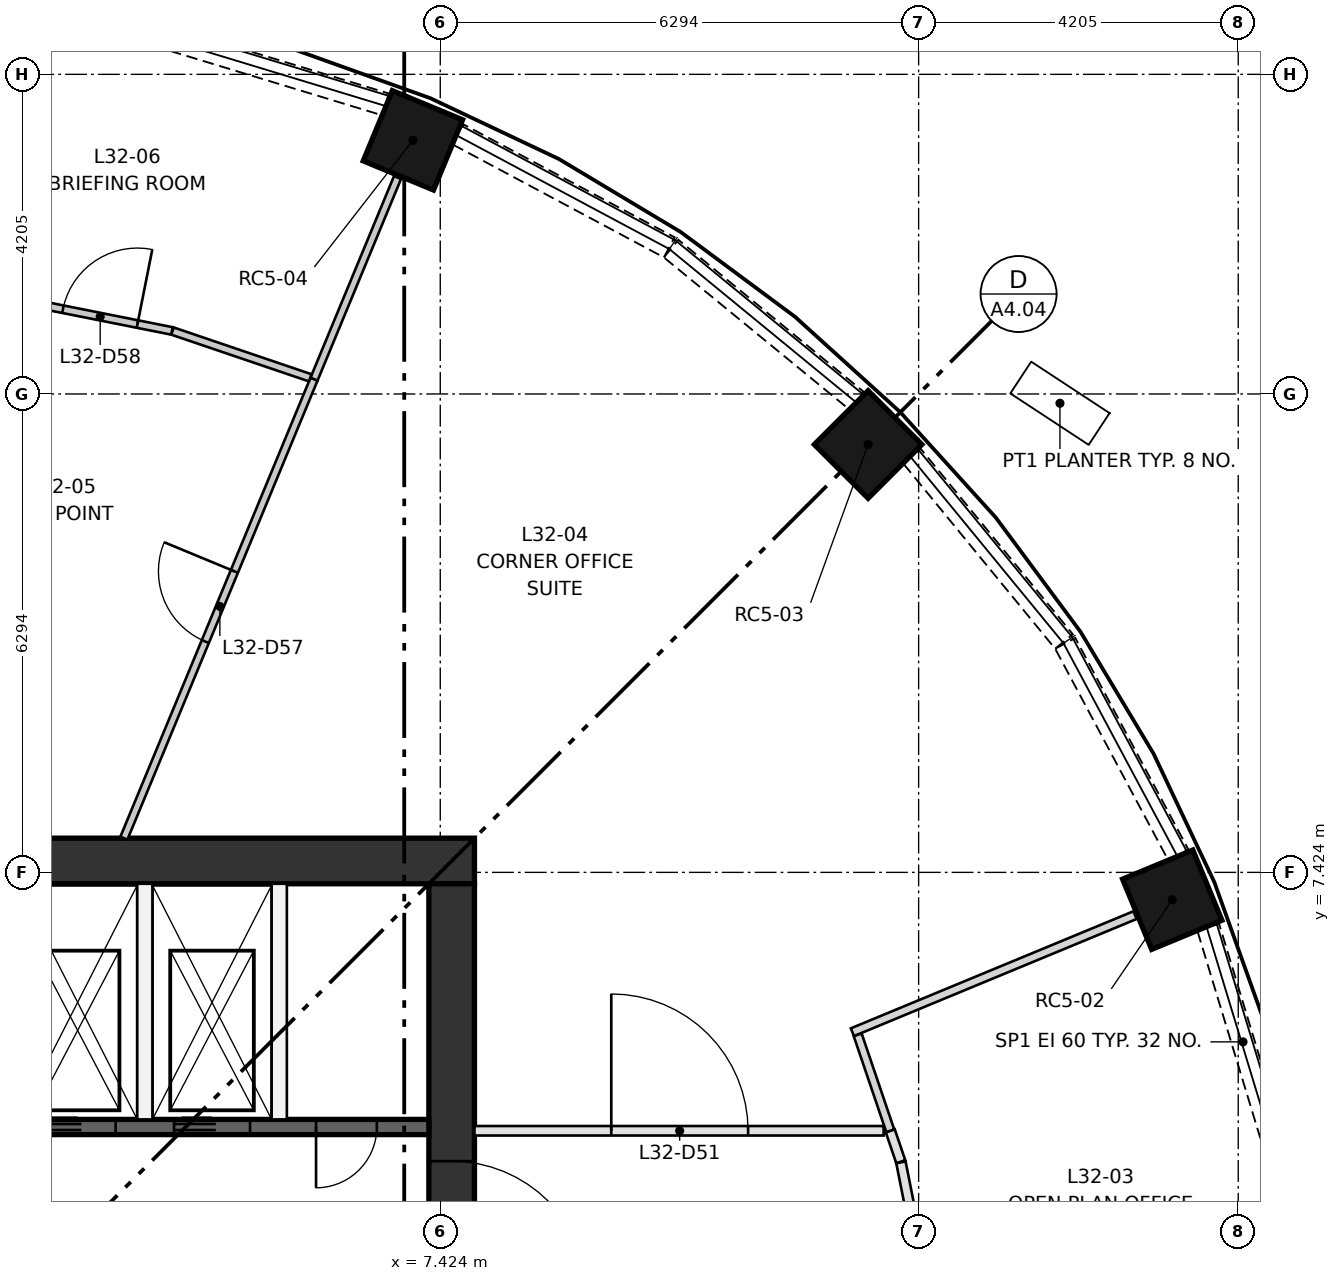
"""IFC4 building model, lengths in metres.
Left out: names, types, materials, properties, quantities, classifications, styles, units other than length and angle.
Written with IfcOpenShell. Run it as: python <this file> out.ifc"""

import sys

from ifc_helpers import new_model, si_unit, direction, frame, frame_2d, origin, origin_2d, place, context, subcontext, project, spatial, rectangle, extrude, element, fill, save


model = new_model("IFC4")
c1 = context("Model", 3, precision=1e-05, world=origin(), true_north=direction((0.0, 1.0)))
c2 = subcontext(c1, "Body", "Model", "MODEL_VIEW")
j1 = project(units=[si_unit("LENGTHUNIT", "METRE"), si_unit("PLANEANGLEUNIT", "RADIAN")], contexts=[c1])
p1 = place(None, origin())
s1 = spatial("IfcSite", under=j1, at=p1, CompositionType="ELEMENT")
p2 = place(p1, origin())
s2 = spatial("IfcBuilding", under=s1, at=p2, CompositionType="ELEMENT")
p3 = place(p2, frame((0.0, 0.0, 124.3)))
s3 = spatial("IfcBuildingStorey", under=s2, at=p3, CompositionType="ELEMENT", Elevation=124.3)
for number, where, z_axis, x_axis in (
    (1, (17.055, 7.064, 0.0), (0.0, 0.0, 1.0), (0.924, 0.383, 0.0)),
    (2, (13.053, 13.053, 0.0), (0.0, 0.0, 1.0), (0.707, 0.707, 0.0)),
    (3, (7.064, 17.055, 0.0), (0.0, 0.0, 1.0), (0.383, 0.924, 0.0)),
):
    element("IfcColumn", number, at=place(p3, frame(where, z_axis=z_axis, x_axis=x_axis)), inside=s3, PredefinedType="COLUMN", context=c2, shape_type="SweptSolid", body=[
        extrude(rectangle(XDim=1.0, YDim=1.0, at=origin_2d()), origin(), (0.0, 0.0, 1.0), 3.35),
    ])
p4 = place(p3, frame((-7.874, 7.574, 0.0), z_axis=(0.0, 0.0, 1.0), x_axis=(1.0, 0.0, 0.0)))
e4 = element("IfcWall", 4, at=p4, inside=s3, PredefinedType="SHEAR", context=c2, shape_type="SweptSolid", body=[
    extrude(rectangle(XDim=15.748, YDim=0.6, at=frame_2d((7.874, 0.0))), origin(), (0.0, 0.0, 1.0), 3.35),
])
p5 = place(p3, frame((7.574, -7.274, 0.0), z_axis=(0.0, 0.0, 1.0), x_axis=(0.0, 1.0, 0.0)))
e5 = element("IfcWall", 5, at=p5, inside=s3, PredefinedType="SHEAR", context=c2, shape_type="SweptSolid", body=[
    extrude(rectangle(XDim=14.548, YDim=0.6, at=frame_2d((7.274, 0.0))), origin(), (0.0, 0.0, 1.0), 3.35),
])
p6 = place(p5, frame((6.774, 0.0, 0.0)))
e6 = element("IfcOpeningElement", 6, at=p6, cuts=e5, PredefinedType="OPENING", context=c2, shape_type="SweptSolid", body=[
    extrude(rectangle(XDim=1.0, YDim=2.1, at=frame_2d((0.5, 1.05))), frame((0.0, 0.31, 0.0), z_axis=(0.0, -1.0, 0.0), x_axis=(1.0, 0.0, 0.0)), (0.0, 0.0, 1.0), 0.62),
])
p7 = place(p5, frame((3.649, 0.0, 0.0)))
e7 = element("IfcOpeningElement", 7, at=p7, cuts=e5, PredefinedType="OPENING", context=c2, shape_type="SweptSolid", body=[
    extrude(rectangle(XDim=1.8, YDim=2.1, at=frame_2d((0.9, 1.05))), frame((0.0, 0.31, 0.0), z_axis=(0.0, -1.0, 0.0), x_axis=(1.0, 0.0, 0.0)), (0.0, 0.0, 1.0), 0.62),
])
p8 = place(p5, frame((9.098, 0.0, 0.0)))
e8 = element("IfcOpeningElement", 8, at=p8, cuts=e5, PredefinedType="OPENING", context=c2, shape_type="SweptSolid", body=[
    extrude(rectangle(XDim=1.8, YDim=2.1, at=frame_2d((0.9, 1.05))), frame((0.0, 0.31, 0.0), z_axis=(0.0, -1.0, 0.0), x_axis=(1.0, 0.0, 0.0)), (0.0, 0.0, 1.0), 0.62),
])
p9 = place(p3, frame((0.0, 4.074, 0.0), z_axis=(0.0, 0.0, 1.0), x_axis=(1.0, 0.0, 0.0)))
e9 = element("IfcWall", 9, at=p9, inside=s3, PredefinedType="SHEAR", context=c2, shape_type="SweptSolid", body=[
    extrude(rectangle(XDim=7.274, YDim=0.2, at=frame_2d((3.637, 0.0))), origin(), (0.0, 0.0, 1.0), 3.0),
])
p10 = place(p9, frame((0.384, 0.0, 0.0)))
e10 = element("IfcOpeningElement", 10, at=p10, cuts=e9, PredefinedType="OPENING", context=c2, shape_type="SweptSolid", body=[
    extrude(rectangle(XDim=1.0, YDim=2.1, at=frame_2d((0.5, 1.05))), frame((0.0, 0.11, 0.0), z_axis=(0.0, -1.0, 0.0), x_axis=(1.0, 0.0, 0.0)), (0.0, 0.0, 1.0), 0.22),
])
p11 = place(p9, frame((2.153, 0.0, 0.0)))
e11 = element("IfcOpeningElement", 11, at=p11, cuts=e9, PredefinedType="OPENING", context=c2, shape_type="SweptSolid", body=[
    extrude(rectangle(XDim=1.0, YDim=2.1, at=frame_2d((0.5, 1.05))), frame((0.0, 0.11, 0.0), z_axis=(0.0, -1.0, 0.0), x_axis=(1.0, 0.0, 0.0)), (0.0, 0.0, 1.0), 0.22),
])
p12 = place(p9, frame((3.921, 0.0, 0.0)))
e12 = element("IfcOpeningElement", 12, at=p12, cuts=e9, PredefinedType="OPENING", context=c2, shape_type="SweptSolid", body=[
    extrude(rectangle(XDim=1.0, YDim=2.1, at=frame_2d((0.5, 1.05))), frame((0.0, 0.11, 0.0), z_axis=(0.0, -1.0, 0.0), x_axis=(1.0, 0.0, 0.0)), (0.0, 0.0, 1.0), 0.22),
])
p13 = place(p9, frame((5.79, 0.0, 0.0)))
e13 = element("IfcOpeningElement", 13, at=p13, cuts=e9, PredefinedType="OPENING", context=c2, shape_type="SweptSolid", body=[
    extrude(rectangle(XDim=0.8, YDim=2.1, at=frame_2d((0.4, 1.05))), frame((0.0, 0.11, 0.0), z_axis=(0.0, -1.0, 0.0), x_axis=(1.0, 0.0, 0.0)), (0.0, 0.0, 1.0), 0.22),
])
for number, where, z_axis, x_axis in (
    (14, (3.537, 4.174, 0.0), (0.0, 0.0, 1.0), (0.0, 1.0, 0.0)),
    (15, (5.305, 4.174, 0.0), (0.0, 0.0, 1.0), (0.0, 1.0, 0.0)),
):
    element("IfcWall", number, at=place(p3, frame(where, z_axis=z_axis, x_axis=x_axis)), inside=s3, PredefinedType="PARTITIONING", context=c2, shape_type="SweptSolid", body=[
        extrude(rectangle(XDim=3.1, YDim=0.2, at=frame_2d((1.55, 0.0))), origin(), (0.0, 0.0, 1.0), 3.0),
    ])
p14 = place(p3, frame((18.445, 3.683, 0.0), z_axis=(0.0, 0.0, 1.0), x_axis=(-0.290503096001, 0.956874051907, 0.0)))
e16 = element("IfcWall", 16, at=p14, inside=s3, PredefinedType="SOLIDWALL", context=c2, shape_type="SweptSolid", body=[
    extrude(rectangle(XDim=3.157, YDim=0.3, at=frame_2d((1.579, 0.0))), origin(), (0.0, 0.0, 1.0), 0.9),
])
p15 = place(p3, frame((17.135, 7.654, 0.0), z_axis=(0.0, 0.0, 1.0), x_axis=(-0.471527722113, 0.881851238747, 0.0)))
e17 = element("IfcWall", 17, at=p15, inside=s3, PredefinedType="SOLIDWALL", context=c2, shape_type="SweptSolid", body=[
    extrude(rectangle(XDim=3.155, YDim=0.3, at=frame_2d((1.578, 0.0))), origin(), (0.0, 0.0, 1.0), 0.9),
])
for number, where, z_axis, x_axis in (
    (18, (15.631, 10.462, 0.0), (0.0, 0.0, 1.0), (-0.634, 0.773, 0.0)),
    (19, (12.902, 13.628, 0.0), (0.0, 0.0, 1.0), (-0.773, 0.634, 0.0)),
):
    element("IfcWall", number, at=place(p3, frame(where, z_axis=z_axis, x_axis=x_axis)), inside=s3, PredefinedType="SOLIDWALL", context=c2, shape_type="SweptSolid", body=[
        extrude(rectangle(XDim=3.157, YDim=0.3, at=frame_2d((1.578, 0.0))), origin(), (0.0, 0.0, 1.0), 0.9),
    ])
p16 = place(p3, frame((10.437, 15.647, 0.0), z_axis=(0.0, 0.0, 1.0), x_axis=(-0.881851238747, 0.471527722113, 0.0)))
e20 = element("IfcWall", 20, at=p16, inside=s3, PredefinedType="SOLIDWALL", context=c2, shape_type="SweptSolid", body=[
    extrude(rectangle(XDim=3.155, YDim=0.3, at=frame_2d((1.578, 0.0))), origin(), (0.0, 0.0, 1.0), 0.9),
])
p17 = place(p3, frame((6.705, 17.527, 0.0), z_axis=(0.0, 0.0, 1.0), x_axis=(-0.956874051907, 0.290503096001, 0.0)))
e21 = element("IfcWall", 21, at=p17, inside=s3, PredefinedType="SOLIDWALL", context=c2, shape_type="SweptSolid", body=[
    extrude(rectangle(XDim=3.157, YDim=0.3, at=frame_2d((1.579, 0.0))), origin(), (0.0, 0.0, 1.0), 0.9),
])
p18 = place(p3, frame((13.345, 4.024, 0.0), z_axis=(0.0, 0.0, 1.0), x_axis=(0.321160043658, -0.947024934391, 0.0)))
e22 = element("IfcWall", 22, at=p18, inside=s3, PredefinedType="PARTITIONING", context=c2, shape_type="SweptSolid", body=[
    extrude(rectangle(XDim=0.43, YDim=0.125, at=frame_2d((0.215, 0.0))), origin(), (0.0, 0.0, 1.0), 3.0),
])
p19 = place(p3, frame((13.485, 3.609, 0.0), z_axis=(0.0, 0.0, 1.0), x_axis=(0.195134630283, -0.980776465901, 0.0)))
e23 = element("IfcWall", 23, at=p19, inside=s3, PredefinedType="PARTITIONING", context=c2, shape_type="SweptSolid", body=[
    extrude(rectangle(XDim=1.818, YDim=0.125, at=frame_2d((0.909, 0.0))), origin(), (0.0, 0.0, 1.0), 3.0),
])
p20 = place(p3, frame((7.874, 4.024, 0.0), z_axis=(0.0, 0.0, 1.0), x_axis=(1.0, 0.0, 0.0)))
e24 = element("IfcWall", 24, at=p20, inside=s3, PredefinedType="PARTITIONING", context=c2, shape_type="SweptSolid", body=[
    extrude(rectangle(XDim=5.384, YDim=0.125, at=frame_2d((2.692, 0.0))), origin(), (0.0, 0.0, 1.0), 3.0),
])
p21 = place(p20, frame((1.8, 0.0, 0.0)))
e25 = element("IfcOpeningElement", 25, at=p21, cuts=e24, PredefinedType="OPENING", context=c2, shape_type="SweptSolid", body=[
    extrude(rectangle(XDim=1.8, YDim=2.1, at=frame_2d((0.9, 1.05))), frame((0.0, 0.073, 0.0), z_axis=(0.0, -1.0, 0.0), x_axis=(1.0, 0.0, 0.0)), (0.0, 0.0, 1.0), 0.145),
])
p22 = place(p3, frame((12.847, 5.321, 0.0), z_axis=(0.0, 0.0, 1.0), x_axis=(0.923877104161, 0.382689294869, 0.0)))
e26 = element("IfcWall", 26, at=p22, inside=s3, PredefinedType="PARTITIONING", context=c2, shape_type="SweptSolid", body=[
    extrude(rectangle(XDim=4.025, YDim=0.11, at=frame_2d((2.012, 0.0))), origin(), (0.0, 0.0, 1.0), 3.0),
])
p23 = place(p3, frame((13.345, 4.024, 0.0), z_axis=(0.0, 0.0, 1.0), x_axis=(-0.32144299332, 0.946928931888, 0.0)))
e27 = element("IfcWall", 27, at=p23, inside=s3, PredefinedType="PARTITIONING", context=c2, shape_type="SweptSolid", body=[
    extrude(rectangle(XDim=1.333, YDim=0.11, at=frame_2d((0.667, 0.0))), origin(), (0.0, 0.0, 1.0), 3.0),
])
p24 = place(p3, frame((3.261, 7.874, 0.0), z_axis=(0.0, 0.0, 1.0), x_axis=(0.382689326263, 0.923877091157, 0.0)))
e28 = element("IfcWall", 28, at=p24, inside=s3, PredefinedType="PARTITIONING", context=c2, shape_type="SweptSolid", body=[
    extrude(rectangle(XDim=6.537, YDim=0.1, at=frame_2d((3.269, 0.0))), origin(), (0.0, 0.0, 1.0), 3.0),
])
p25 = place(p24, frame((2.8, 0.0, 0.0)))
e29 = element("IfcOpeningElement", 29, at=p25, cuts=e28, PredefinedType="OPENING", context=c2, shape_type="SweptSolid", body=[
    extrude(rectangle(XDim=1.0, YDim=2.1, at=frame_2d((0.5, 1.05))), frame((0.0, 0.06, 0.0), z_axis=(0.0, -1.0, 0.0), x_axis=(1.0, 0.0, 0.0)), (0.0, 0.0, 1.0), 0.12),
])
p26 = place(p3, frame((5.763, 13.914, 0.0), z_axis=(0.0, 0.0, 1.0), x_axis=(0.382699877515, 0.923872720536, 0.0)))
e30 = element("IfcWall", 30, at=p26, inside=s3, PredefinedType="PARTITIONING", context=c2, shape_type="SweptSolid", body=[
    extrude(rectangle(XDim=2.87, YDim=0.1, at=frame_2d((1.435, 0.0))), origin(), (0.0, 0.0, 1.0), 3.0),
])
p27 = place(p3, frame((1.969, 14.931, 0.0), z_axis=(0.0, 0.0, 1.0), x_axis=(0.980757237699, -0.195231249295, 0.0)))
e31 = element("IfcWall", 31, at=p27, inside=s3, PredefinedType="PARTITIONING", context=c2, shape_type="SweptSolid", body=[
    extrude(rectangle(XDim=1.963, YDim=0.1, at=frame_2d((0.982, 0.0))), origin(), (0.0, 0.0, 1.0), 3.0),
])
p28 = place(p27, frame((0.5, 0.0, 0.0)))
e32 = element("IfcOpeningElement", 32, at=p28, cuts=e31, PredefinedType="OPENING", context=c2, shape_type="SweptSolid", body=[
    extrude(rectangle(XDim=1.0, YDim=2.1, at=frame_2d((0.5, 1.05))), frame((0.0, 0.06, 0.0), z_axis=(0.0, -1.0, 0.0), x_axis=(1.0, 0.0, 0.0)), (0.0, 0.0, 1.0), 0.12),
])
p29 = place(p3, frame((3.901, 14.546, 0.0), z_axis=(0.0, 0.0, 1.0), x_axis=(0.946972460269, -0.321314735879, 0.0)))
e33 = element("IfcWall", 33, at=p29, inside=s3, PredefinedType="PARTITIONING", context=c2, shape_type="SweptSolid", body=[
    extrude(rectangle(XDim=1.913, YDim=0.1, at=frame_2d((0.957, 0.0))), origin(), (0.0, 0.0, 1.0), 3.0),
])
p30 = place(p11, frame((1.0, 0.0, 0.0), z_axis=(0.0, 0.0, 1.0), x_axis=(-1.0, 0.0, 0.0)))
e34 = element("IfcDoor", 34, at=p30, inside=s3, OperationType="DOUBLE_DOOR_SLIDING", PredefinedType="DOOR", context=c2, shape_type="SweptSolid", body=[
    extrude(rectangle(XDim=1.0, YDim=2.1, at=frame_2d((0.5, 1.05))), frame((0.0, 0.025, 0.0), z_axis=(0.0, -1.0, 0.0), x_axis=(1.0, 0.0, 0.0)), (0.0, 0.0, 1.0), 0.05),
])
fill(e11, e34)
p31 = place(p12, frame((1.0, 0.0, 0.0), z_axis=(0.0, 0.0, 1.0), x_axis=(-1.0, 0.0, 0.0)))
e35 = element("IfcDoor", 35, at=p31, inside=s3, OperationType="DOUBLE_DOOR_SLIDING", PredefinedType="DOOR", context=c2, shape_type="SweptSolid", body=[
    extrude(rectangle(XDim=1.0, YDim=2.1, at=frame_2d((0.5, 1.05))), frame((0.0, 0.025, 0.0), z_axis=(0.0, -1.0, 0.0), x_axis=(1.0, 0.0, 0.0)), (0.0, 0.0, 1.0), 0.05),
])
fill(e12, e35)
p32 = place(p13, frame((0.8, 0.0, 0.0), z_axis=(0.0, 0.0, 1.0), x_axis=(-1.0, 0.0, 0.0)))
e36 = element("IfcDoor", 36, at=p32, inside=s3, OperationType="SINGLE_SWING_LEFT", PredefinedType="DOOR", context=c2, shape_type="SweptSolid", body=[
    extrude(rectangle(XDim=0.8, YDim=2.1, at=frame_2d((0.4, 1.05))), frame((0.0, 0.025, 0.0), z_axis=(0.0, -1.0, 0.0), x_axis=(1.0, 0.0, 0.0)), (0.0, 0.0, 1.0), 0.05),
])
fill(e13, e36)
p33 = place(p8, frame((1.8, 0.0, 0.0), z_axis=(0.0, 0.0, 1.0), x_axis=(-1.0, 0.0, 0.0)))
e37 = element("IfcDoor", 37, at=p33, inside=s3, OperationType="DOUBLE_DOOR_SINGLE_SWING", PredefinedType="DOOR", context=c2, shape_type="SweptSolid", body=[
    extrude(rectangle(XDim=1.8, YDim=2.1, at=frame_2d((0.9, 1.05))), frame((0.0, 0.025, 0.0), z_axis=(0.0, -1.0, 0.0), x_axis=(1.0, 0.0, 0.0)), (0.0, 0.0, 1.0), 0.05),
])
fill(e8, e37)
p34 = place(p21, origin())
e38 = element("IfcDoor", 38, at=p34, inside=s3, OperationType="DOUBLE_DOOR_SINGLE_SWING", PredefinedType="DOOR", context=c2, shape_type="SweptSolid", body=[
    extrude(rectangle(XDim=1.8, YDim=2.1, at=frame_2d((0.9, 1.05))), frame((0.0, 0.025, 0.0), z_axis=(0.0, -1.0, 0.0), x_axis=(1.0, 0.0, 0.0)), (0.0, 0.0, 1.0), 0.05),
])
fill(e25, e38)
p35 = place(p25, origin())
e39 = element("IfcDoor", 39, at=p35, inside=s3, OperationType="SINGLE_SWING_RIGHT", PredefinedType="DOOR", context=c2, shape_type="SweptSolid", body=[
    extrude(rectangle(XDim=1.0, YDim=2.1, at=frame_2d((0.5, 1.05))), frame((0.0, 0.025, 0.0), z_axis=(0.0, -1.0, 0.0), x_axis=(1.0, 0.0, 0.0)), (0.0, 0.0, 1.0), 0.05),
])
fill(e29, e39)
p36 = place(p28, origin())
e40 = element("IfcDoor", 40, at=p36, inside=s3, OperationType="SINGLE_SWING_RIGHT", PredefinedType="DOOR", context=c2, shape_type="SweptSolid", body=[
    extrude(rectangle(XDim=1.0, YDim=2.1, at=frame_2d((0.5, 1.05))), frame((0.0, 0.025, 0.0), z_axis=(0.0, -1.0, 0.0), x_axis=(1.0, 0.0, 0.0)), (0.0, 0.0, 1.0), 0.05),
])
fill(e32, e40)
save(model, sys.argv[1])
